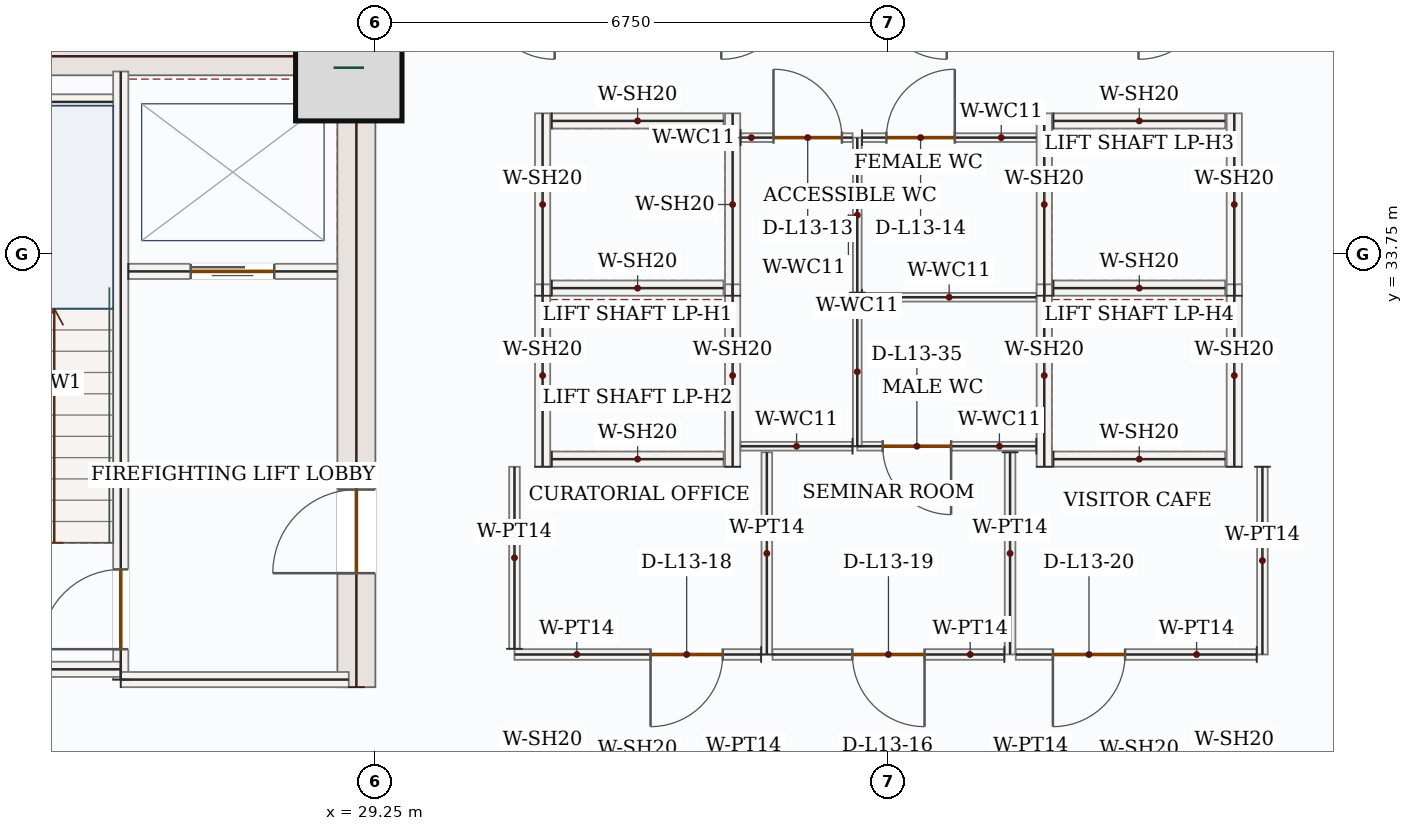
"""IFC4 building model, lengths in metres.
Left out: names, types, materials, properties, quantities, classifications, styles, units other than length and angle.
Written with IfcOpenShell. Run it as: python <this file> out.ifc"""

import sys

from ifc_helpers import new_model, si_unit, direction, frame, frame_2d, origin, origin_2d, place, context, subcontext, project, spatial, rectangle, extrude, source, transform, mapped, element, fill, save


model = new_model("IFC4")
c1 = context("Model", 3, precision=1e-05, world=origin(), true_north=direction((0.0, 1.0)))
c2 = subcontext(c1, "Body", "Model", "MODEL_VIEW")
j1 = project(units=[si_unit("LENGTHUNIT", "METRE"), si_unit("PLANEANGLEUNIT", "RADIAN")], contexts=[c1])
p1 = place(None, origin())
s1 = spatial("IfcSite", under=j1, at=p1, CompositionType="ELEMENT")
p2 = place(p1, origin())
s2 = spatial("IfcBuilding", under=s1, at=p2, CompositionType="ELEMENT")
p3 = place(p2, frame((0.0, 0.0, 62.7)))
s3 = spatial("IfcBuildingStorey", under=s2, at=p3, CompositionType="ELEMENT", Elevation=62.7)
p4 = place(p3, frame((29.0, 28.05, 0.0), z_axis=(0.0, 0.0, 1.0), x_axis=(0.0, 1.0, 0.0)))
e1 = element("IfcWall", 1, at=p4, inside=s3, PredefinedType="SHEAR", context=c2, shape_type="SweptSolid", body=[
    extrude(rectangle(XDim=8.55, YDim=0.5, at=frame_2d((4.275, 0.0))), origin(), (0.0, 0.0, 1.0), 3.95),
])
p5 = place(p4, frame((1.5, 0.0, 0.0)))
e2 = element("IfcOpeningElement", 2, at=p5, cuts=e1, PredefinedType="OPENING", context=c2, shape_type="SweptSolid", body=[
    extrude(rectangle(XDim=1.1, YDim=2.2, at=frame_2d((0.55, 1.1))), frame((0.0, 0.26, 0.0), z_axis=(0.0, -1.0, 0.0), x_axis=(1.0, 0.0, 0.0)), (0.0, 0.0, 1.0), 0.52),
])
m1 = source(origin(), c2, "Body", "SweptSolid", [
    extrude(rectangle(XDim=7.0, YDim=0.5, at=frame_2d((3.5, 0.0))), origin(), (0.0, 0.0, 1.0), 3.95),
])
p6 = place(p3, frame((21.75, 36.35, 0.0), z_axis=(0.0, 0.0, 1.0), x_axis=(1.0, 0.0, 0.0)))
e3 = element("IfcWall", 3, at=p6, inside=s3, PredefinedType="SHEAR", context=c2, shape_type="MappedRepresentation", body=[
    mapped(m1, transform((0.0, 0.0, 0.0), x_axis=(1.0, 0.0, 0.0), y_axis=(0.0, 1.0, 0.0), z_axis=(0.0, 0.0, 1.0), scale=1.0)),
])
m2 = source(origin(), c2, "Body", "SweptSolid", [
    extrude(rectangle(XDim=1.4, YDim=1.4, at=origin_2d()), origin(), (0.0, 0.0, 1.0), 4.2),
])
p7 = place(p3, frame((28.9, 36.2, 0.0), z_axis=(0.0, 0.0, 1.0), x_axis=(1.0, 0.0, 0.0)))
e4 = element("IfcColumn", 4, at=p7, inside=s3, PredefinedType="COLUMN", context=c2, shape_type="MappedRepresentation", body=[
    mapped(m2, transform((0.0, 0.0, 0.0), x_axis=(1.0, 0.0, 0.0), y_axis=(0.0, 1.0, 0.0), z_axis=(0.0, 0.0, 1.0), scale=1.0)),
])
p8 = place(p3, frame((25.9, 28.15, 0.0), z_axis=(0.0, 0.0, 1.0), x_axis=(0.0, 1.0, 0.0)))
e5 = element("IfcWall", 5, at=p8, inside=s3, PredefinedType="SOLIDWALL", context=c2, shape_type="SweptSolid", body=[
    extrude(rectangle(XDim=8.0, YDim=0.2, at=frame_2d((4.0, 0.0))), origin(), (0.0, 0.0, 1.0), 3.95),
])
p9 = place(p8, frame((0.4, 0.0, 0.0)))
e6 = element("IfcOpeningElement", 6, at=p9, cuts=e5, PredefinedType="OPENING", context=c2, shape_type="SweptSolid", body=[
    extrude(rectangle(XDim=1.05, YDim=2.15, at=frame_2d((0.525, 1.075))), frame((0.0, 0.11, 0.0), z_axis=(0.0, -1.0, 0.0), x_axis=(1.0, 0.0, 0.0)), (0.0, 0.0, 1.0), 0.22),
])
m3 = source(origin(), c2, "Body", "SweptSolid", [
    extrude(rectangle(XDim=4.25, YDim=0.2, at=frame_2d((2.125, 0.0))), origin(), (0.0, 0.0, 1.0), 3.95),
])
p10 = place(p3, frame((21.65, 28.285, 0.0), z_axis=(0.0, 0.0, 1.0), x_axis=(1.0, 0.0, 0.0)))
e7 = element("IfcWall", 7, at=p10, inside=s3, PredefinedType="SOLIDWALL", context=c2, shape_type="MappedRepresentation", body=[
    mapped(m3, transform((0.0, 0.0, 0.0), x_axis=(1.0, 0.0, 0.0), y_axis=(0.0, 1.0, 0.0), z_axis=(0.0, 0.0, 1.0), scale=1.0)),
])
m4 = source(origin(), c2, "Body", "SweptSolid", [
    extrude(rectangle(XDim=3.0, YDim=0.2, at=frame_2d((1.5, 0.0))), origin(), (0.0, 0.0, 1.0), 3.95),
])
p11 = place(p3, frame((25.9, 28.15, 0.0), z_axis=(0.0, 0.0, 1.0), x_axis=(1.0, 0.0, 0.0)))
e8 = element("IfcWall", 8, at=p11, inside=s3, PredefinedType="SOLIDWALL", context=c2, shape_type="MappedRepresentation", body=[
    mapped(m4, transform((0.0, 0.0, 0.0), x_axis=(1.0, 0.0, 0.0), y_axis=(0.0, 1.0, 0.0), z_axis=(0.0, 0.0, 1.0), scale=1.0)),
])
m5 = source(origin(), c2, "Body", "SweptSolid", [
    extrude(rectangle(XDim=3.25, YDim=0.2, at=frame_2d((1.625, 0.0))), origin(), (0.0, 0.0, 1.0), 3.95),
])
p12 = place(p3, frame((22.55, 35.75, 0.0), z_axis=(0.0, 0.0, 1.0), x_axis=(1.0, 0.0, 0.0)))
e9 = element("IfcWall", 9, at=p12, inside=s3, PredefinedType="SOLIDWALL", context=c2, shape_type="MappedRepresentation", body=[
    mapped(m5, transform((0.0, 0.0, 0.0), x_axis=(1.0, 0.0, 0.0), y_axis=(0.0, 1.0, 0.0), z_axis=(0.0, 0.0, 1.0), scale=1.0)),
])
p13 = place(p3, frame((26.0, 33.52, 0.0), z_axis=(0.0, 0.0, 1.0), x_axis=(1.0, 0.0, 0.0)))
e10 = element("IfcWall", 10, at=p13, inside=s3, PredefinedType="SOLIDWALL", context=c2, shape_type="SweptSolid", body=[
    extrude(rectangle(XDim=2.75, YDim=0.2, at=frame_2d((1.375, 0.0))), origin(), (0.0, 0.0, 1.0), 3.95),
])
p14 = place(p13, frame((0.82, 0.0, 0.0)))
e11 = element("IfcOpeningElement", 11, at=p14, cuts=e10, PredefinedType="OPENING", context=c2, shape_type="SweptSolid", body=[
    extrude(rectangle(XDim=1.1, YDim=2.15, at=frame_2d((0.55, 1.075))), frame((0.0, 0.11, 0.0), z_axis=(0.0, -1.0, 0.0), x_axis=(1.0, 0.0, 0.0)), (0.0, 0.0, 1.0), 0.22),
])
m6 = source(origin(), c2, "Body", "SweptSolid", [
    extrude(rectangle(XDim=2.4, YDim=0.2, at=frame_2d((1.2, 0.0))), origin(), (0.0, 0.0, 1.0), 3.95),
])
for number, where, z_axis, x_axis in (
    (12, (31.45, 33.2, 0.0), (0.0, 0.0, 1.0), (0.0, 1.0, 0.0)),
    (13, (33.95, 33.2, 0.0), (0.0, 0.0, 1.0), (0.0, 1.0, 0.0)),
):
    element("IfcWall", number, at=place(p3, frame(where, z_axis=z_axis, x_axis=x_axis)), inside=s3, PredefinedType="SOLIDWALL", context=c2, shape_type="MappedRepresentation", body=[
        mapped(m6, transform((0.0, 0.0, 0.0), x_axis=(1.0, 0.0, 0.0), y_axis=(0.0, 1.0, 0.0), z_axis=(0.0, 0.0, 1.0), scale=1.0)),
    ])
m7 = source(origin(), c2, "Body", "SweptSolid", [
    extrude(rectangle(XDim=2.26, YDim=0.2, at=frame_2d((1.13, 0.0))), origin(), (0.0, 0.0, 1.0), 3.95),
])
for number, where, z_axis, x_axis in (
    (14, (31.57, 33.3, 0.0), (0.0, 0.0, 1.0), (1.0, 0.0, 0.0)),
    (15, (31.57, 35.5, 0.0), (0.0, 0.0, 1.0), (1.0, 0.0, 0.0)),
):
    element("IfcWall", number, at=place(p3, frame(where, z_axis=z_axis, x_axis=x_axis)), inside=s3, PredefinedType="SOLIDWALL", context=c2, shape_type="MappedRepresentation", body=[
        mapped(m7, transform((0.0, 0.0, 0.0), x_axis=(1.0, 0.0, 0.0), y_axis=(0.0, 1.0, 0.0), z_axis=(0.0, 0.0, 1.0), scale=1.0)),
    ])
for number, where, z_axis, x_axis in (
    (16, (31.45, 30.95, 0.0), (0.0, 0.0, 1.0), (0.0, 1.0, 0.0)),
    (17, (33.95, 30.95, 0.0), (0.0, 0.0, 1.0), (0.0, 1.0, 0.0)),
):
    element("IfcWall", number, at=place(p3, frame(where, z_axis=z_axis, x_axis=x_axis)), inside=s3, PredefinedType="SOLIDWALL", context=c2, shape_type="MappedRepresentation", body=[
        mapped(m6, transform((0.0, 0.0, 0.0), x_axis=(1.0, 0.0, 0.0), y_axis=(0.0, 1.0, 0.0), z_axis=(0.0, 0.0, 1.0), scale=1.0)),
    ])
p15 = place(p3, frame((31.57, 31.05, 0.0), z_axis=(0.0, 0.0, 1.0), x_axis=(1.0, 0.0, 0.0)))
e18 = element("IfcWall", 18, at=p15, inside=s3, PredefinedType="SOLIDWALL", context=c2, shape_type="MappedRepresentation", body=[
    mapped(m7, transform((0.0, 0.0, 0.0), x_axis=(1.0, 0.0, 0.0), y_axis=(0.0, 1.0, 0.0), z_axis=(0.0, 0.0, 1.0), scale=1.0)),
])
for number, where, z_axis, x_axis in (
    (19, (38.05, 33.2, 0.0), (0.0, 0.0, 1.0), (0.0, 1.0, 0.0)),
    (20, (40.55, 33.2, 0.0), (0.0, 0.0, 1.0), (0.0, 1.0, 0.0)),
):
    element("IfcWall", number, at=place(p3, frame(where, z_axis=z_axis, x_axis=x_axis)), inside=s3, PredefinedType="SOLIDWALL", context=c2, shape_type="MappedRepresentation", body=[
        mapped(m6, transform((0.0, 0.0, 0.0), x_axis=(1.0, 0.0, 0.0), y_axis=(0.0, 1.0, 0.0), z_axis=(0.0, 0.0, 1.0), scale=1.0)),
    ])
for number, where, z_axis, x_axis in (
    (21, (38.17, 33.3, 0.0), (0.0, 0.0, 1.0), (1.0, 0.0, 0.0)),
    (22, (38.17, 35.5, 0.0), (0.0, 0.0, 1.0), (1.0, 0.0, 0.0)),
):
    element("IfcWall", number, at=place(p3, frame(where, z_axis=z_axis, x_axis=x_axis)), inside=s3, PredefinedType="SOLIDWALL", context=c2, shape_type="MappedRepresentation", body=[
        mapped(m7, transform((0.0, 0.0, 0.0), x_axis=(1.0, 0.0, 0.0), y_axis=(0.0, 1.0, 0.0), z_axis=(0.0, 0.0, 1.0), scale=1.0)),
    ])
for number, where, z_axis, x_axis in (
    (23, (38.05, 30.95, 0.0), (0.0, 0.0, 1.0), (0.0, 1.0, 0.0)),
    (24, (40.55, 30.95, 0.0), (0.0, 0.0, 1.0), (0.0, 1.0, 0.0)),
):
    element("IfcWall", number, at=place(p3, frame(where, z_axis=z_axis, x_axis=x_axis)), inside=s3, PredefinedType="SOLIDWALL", context=c2, shape_type="MappedRepresentation", body=[
        mapped(m6, transform((0.0, 0.0, 0.0), x_axis=(1.0, 0.0, 0.0), y_axis=(0.0, 1.0, 0.0), z_axis=(0.0, 0.0, 1.0), scale=1.0)),
    ])
p16 = place(p3, frame((38.17, 31.05, 0.0), z_axis=(0.0, 0.0, 1.0), x_axis=(1.0, 0.0, 0.0)))
e25 = element("IfcWall", 25, at=p16, inside=s3, PredefinedType="SOLIDWALL", context=c2, shape_type="MappedRepresentation", body=[
    mapped(m7, transform((0.0, 0.0, 0.0), x_axis=(1.0, 0.0, 0.0), y_axis=(0.0, 1.0, 0.0), z_axis=(0.0, 0.0, 1.0), scale=1.0)),
])
p17 = place(p3, frame((37.945, 31.22, 0.0), z_axis=(0.0, 0.0, 1.0), x_axis=(-1.0, 0.0, 0.0)))
e26 = element("IfcWall", 26, at=p17, inside=s3, PredefinedType="PARTITIONING", context=c2, shape_type="SweptSolid", body=[
    extrude(rectangle(XDim=2.355, YDim=0.115, at=frame_2d((1.177, 0.0))), origin(), (0.0, 0.0, 1.0), 3.95),
])
p18 = place(p17, frame((1.121, 0.0, 0.0)))
e27 = element("IfcOpeningElement", 27, at=p18, cuts=e26, PredefinedType="OPENING", context=c2, shape_type="SweptSolid", body=[
    extrude(rectangle(XDim=0.9, YDim=2.1, at=frame_2d((0.45, 1.05))), frame((0.0, 0.067, 0.0), z_axis=(0.0, -1.0, 0.0), x_axis=(1.0, 0.0, 0.0)), (0.0, 0.0, 1.0), 0.135),
])
m8 = source(origin(), c2, "Body", "SweptSolid", [
    extrude(rectangle(XDim=1.96, YDim=0.115, at=frame_2d((0.98, 0.0))), origin(), (0.0, 0.0, 1.0), 3.95),
])
p19 = place(p3, frame((35.59, 31.22, 0.0), z_axis=(0.0, 0.0, 1.0), x_axis=(0.0, 1.0, 0.0)))
e28 = element("IfcWall", 28, at=p19, inside=s3, PredefinedType="PARTITIONING", context=c2, shape_type="MappedRepresentation", body=[
    mapped(m8, transform((0.0, 0.0, 0.0), x_axis=(1.0, 0.0, 0.0), y_axis=(0.0, 1.0, 0.0), z_axis=(0.0, 0.0, 1.0), scale=1.0)),
])
m9 = source(origin(), c2, "Body", "SweptSolid", [
    extrude(rectangle(XDim=2.292, YDim=0.115, at=frame_2d((1.146, 0.0))), origin(), (0.0, 0.0, 1.0), 3.95),
])
p20 = place(p3, frame((35.653, 33.18, 0.0), z_axis=(0.0, 0.0, 1.0), x_axis=(1.0, 0.0, 0.0)))
e29 = element("IfcWall", 29, at=p20, inside=s3, PredefinedType="PARTITIONING", context=c2, shape_type="MappedRepresentation", body=[
    mapped(m9, transform((0.0, 0.0, 0.0), x_axis=(1.0, 0.0, 0.0), y_axis=(0.0, 1.0, 0.0), z_axis=(0.0, 0.0, 1.0), scale=1.0)),
])
m10 = source(origin(), c2, "Body", "SweptSolid", [
    extrude(rectangle(XDim=2.04, YDim=0.115, at=frame_2d((1.02, 0.0))), origin(), (0.0, 0.0, 1.0), 3.95),
])
p21 = place(p3, frame((35.59, 33.24, 0.0), z_axis=(0.0, 0.0, 1.0), x_axis=(0.0, 1.0, 0.0)))
e30 = element("IfcWall", 30, at=p21, inside=s3, PredefinedType="PARTITIONING", context=c2, shape_type="MappedRepresentation", body=[
    mapped(m10, transform((0.0, 0.0, 0.0), x_axis=(1.0, 0.0, 0.0), y_axis=(0.0, 1.0, 0.0), z_axis=(0.0, 0.0, 1.0), scale=1.0)),
])
p22 = place(p3, frame((35.653, 35.28, 0.0), z_axis=(0.0, 0.0, 1.0), x_axis=(1.0, 0.0, 0.0)))
e31 = element("IfcWall", 31, at=p22, inside=s3, PredefinedType="PARTITIONING", context=c2, shape_type="SweptSolid", body=[
    extrude(rectangle(XDim=2.292, YDim=0.115, at=frame_2d((1.146, 0.0))), origin(), (0.0, 0.0, 1.0), 3.95),
])
p23 = place(p22, frame((0.32, 0.0, 0.0)))
e32 = element("IfcOpeningElement", 32, at=p23, cuts=e31, PredefinedType="OPENING", context=c2, shape_type="SweptSolid", body=[
    extrude(rectangle(XDim=0.9, YDim=2.1, at=frame_2d((0.45, 1.05))), frame((0.0, 0.067, 0.0), z_axis=(0.0, -1.0, 0.0), x_axis=(1.0, 0.0, 0.0)), (0.0, 0.0, 1.0), 0.135),
])
m11 = source(origin(), c2, "Body", "SweptSolid", [
    extrude(rectangle(XDim=1.473, YDim=0.115, at=frame_2d((0.736, 0.0))), origin(), (0.0, 0.0, 1.0), 3.95),
])
p24 = place(p3, frame((35.528, 31.22, 0.0), z_axis=(0.0, 0.0, 1.0), x_axis=(-1.0, 0.0, 0.0)))
e33 = element("IfcWall", 33, at=p24, inside=s3, PredefinedType="PARTITIONING", context=c2, shape_type="MappedRepresentation", body=[
    mapped(m11, transform((0.0, 0.0, 0.0), x_axis=(1.0, 0.0, 0.0), y_axis=(0.0, 1.0, 0.0), z_axis=(0.0, 0.0, 1.0), scale=1.0)),
])
p25 = place(p3, frame((34.055, 35.28, 0.0), z_axis=(0.0, 0.0, 1.0), x_axis=(1.0, 0.0, 0.0)))
e34 = element("IfcWall", 34, at=p25, inside=s3, PredefinedType="PARTITIONING", context=c2, shape_type="SweptSolid", body=[
    extrude(rectangle(XDim=1.473, YDim=0.115, at=frame_2d((0.736, 0.0))), origin(), (0.0, 0.0, 1.0), 3.95),
])
p26 = place(p25, frame((0.433, 0.0, 0.0)))
e35 = element("IfcOpeningElement", 35, at=p26, cuts=e34, PredefinedType="OPENING", context=c2, shape_type="SweptSolid", body=[
    extrude(rectangle(XDim=0.9, YDim=2.1, at=frame_2d((0.45, 1.05))), frame((0.0, 0.067, 0.0), z_axis=(0.0, -1.0, 0.0), x_axis=(1.0, 0.0, 0.0)), (0.0, 0.0, 1.0), 0.135),
])
m12 = source(origin(), c2, "Body", "SweptSolid", [
    extrude(rectangle(XDim=2.66, YDim=0.14, at=frame_2d((1.33, 0.0))), origin(), (0.0, 0.0, 1.0), 3.95),
])
for number, where, z_axis, x_axis in (
    (36, (34.4, 28.48, 0.0), (0.0, 0.0, 1.0), (0.0, 1.0, 0.0)),
    (37, (37.6, 31.14, 0.0), (0.0, 0.0, 1.0), (0.0, -1.0, 0.0)),
):
    element("IfcWall", number, at=place(p3, frame(where, z_axis=z_axis, x_axis=x_axis)), inside=s3, PredefinedType="PARTITIONING", context=c2, shape_type="MappedRepresentation", body=[
        mapped(m12, transform((0.0, 0.0, 0.0), x_axis=(1.0, 0.0, 0.0), y_axis=(0.0, 1.0, 0.0), z_axis=(0.0, 0.0, 1.0), scale=1.0)),
    ])
p27 = place(p3, frame((37.525, 28.48, 0.0), z_axis=(0.0, 0.0, 1.0), x_axis=(-1.0, 0.0, 0.0)))
e38 = element("IfcWall", 38, at=p27, inside=s3, PredefinedType="PARTITIONING", context=c2, shape_type="SweptSolid", body=[
    extrude(rectangle(XDim=3.05, YDim=0.14, at=frame_2d((1.525, 0.0))), origin(), (0.0, 0.0, 1.0), 3.95),
])
p28 = place(p27, frame((1.05, 0.0, 0.0)))
e39 = element("IfcOpeningElement", 39, at=p28, cuts=e38, PredefinedType="OPENING", context=c2, shape_type="SweptSolid", body=[
    extrude(rectangle(XDim=0.95, YDim=2.15, at=frame_2d((0.475, 1.075))), frame((0.0, 0.08, 0.0), z_axis=(0.0, -1.0, 0.0), x_axis=(1.0, 0.0, 0.0)), (0.0, 0.0, 1.0), 0.16),
])
p29 = place(p3, frame((34.325, 28.48, 0.0), z_axis=(0.0, 0.0, 1.0), x_axis=(-1.0, 0.0, 0.0)))
e40 = element("IfcWall", 40, at=p29, inside=s3, PredefinedType="PARTITIONING", context=c2, shape_type="SweptSolid", body=[
    extrude(rectangle(XDim=3.245, YDim=0.14, at=frame_2d((1.623, 0.0))), origin(), (0.0, 0.0, 1.0), 3.95),
])
p30 = place(p29, frame((0.505, 0.0, 0.0)))
e41 = element("IfcOpeningElement", 41, at=p30, cuts=e40, PredefinedType="OPENING", context=c2, shape_type="SweptSolid", body=[
    extrude(rectangle(XDim=0.95, YDim=2.15, at=frame_2d((0.475, 1.075))), frame((0.0, 0.08, 0.0), z_axis=(0.0, -1.0, 0.0), x_axis=(1.0, 0.0, 0.0)), (0.0, 0.0, 1.0), 0.16),
])
m13 = source(origin(), c2, "Body", "SweptSolid", [
    extrude(rectangle(XDim=2.395, YDim=0.14, at=frame_2d((1.198, 0.0))), origin(), (0.0, 0.0, 1.0), 3.95),
])
p31 = place(p3, frame((31.08, 28.555, 0.0), z_axis=(0.0, 0.0, 1.0), x_axis=(0.0, 1.0, 0.0)))
e42 = element("IfcWall", 42, at=p31, inside=s3, PredefinedType="PARTITIONING", context=c2, shape_type="MappedRepresentation", body=[
    mapped(m13, transform((0.0, 0.0, 0.0), x_axis=(1.0, 0.0, 0.0), y_axis=(0.0, 1.0, 0.0), z_axis=(0.0, 0.0, 1.0), scale=1.0)),
])
m14 = source(origin(), c2, "Body", "SweptSolid", [
    extrude(rectangle(XDim=2.47, YDim=0.14, at=frame_2d((1.235, 0.0))), origin(), (0.0, 0.0, 1.0), 3.95),
])
p32 = place(p3, frame((40.92, 30.95, 0.0), z_axis=(0.0, 0.0, 1.0), x_axis=(0.0, -1.0, 0.0)))
e43 = element("IfcWall", 43, at=p32, inside=s3, PredefinedType="PARTITIONING", context=c2, shape_type="MappedRepresentation", body=[
    mapped(m14, transform((0.0, 0.0, 0.0), x_axis=(1.0, 0.0, 0.0), y_axis=(0.0, 1.0, 0.0), z_axis=(0.0, 0.0, 1.0), scale=1.0)),
])
p33 = place(p3, frame((40.845, 28.48, 0.0), z_axis=(0.0, 0.0, 1.0), x_axis=(-1.0, 0.0, 0.0)))
e44 = element("IfcWall", 44, at=p33, inside=s3, PredefinedType="PARTITIONING", context=c2, shape_type="SweptSolid", body=[
    extrude(rectangle(XDim=3.17, YDim=0.14, at=frame_2d((1.585, 0.0))), origin(), (0.0, 0.0, 1.0), 3.95),
])
p34 = place(p33, frame((1.732, 0.0, 0.0)))
e45 = element("IfcOpeningElement", 45, at=p34, cuts=e44, PredefinedType="OPENING", context=c2, shape_type="SweptSolid", body=[
    extrude(rectangle(XDim=0.95, YDim=2.15, at=frame_2d((0.475, 1.075))), frame((0.0, 0.08, 0.0), z_axis=(0.0, -1.0, 0.0), x_axis=(1.0, 0.0, 0.0)), (0.0, 0.0, 1.0), 0.16),
])
m15 = source(origin(), c2, "Body", "SweptSolid", [
    extrude(rectangle(XDim=1.05, YDim=2.15, at=frame_2d((0.525, 1.075))), frame((0.0, 0.025, 0.0), z_axis=(0.0, -1.0, 0.0), x_axis=(1.0, 0.0, 0.0)), (0.0, 0.0, 1.0), 0.05),
])
p35 = place(p9, origin())
e46 = element("IfcDoor", 46, at=p35, inside=s3, OperationType="SINGLE_SWING_LEFT", PredefinedType="DOOR", context=c2, shape_type="MappedRepresentation", body=[
    mapped(m15, transform((0.0, 0.0, 0.0), x_axis=(1.0, 0.0, 0.0), y_axis=(0.0, 1.0, 0.0), z_axis=(0.0, 0.0, 1.0), scale=1.0)),
])
fill(e6, e46)
m16 = source(origin(), c2, "Body", "SweptSolid", [
    extrude(rectangle(XDim=1.1, YDim=2.15, at=frame_2d((0.55, 1.075))), frame((0.0, 0.025, 0.0), z_axis=(0.0, -1.0, 0.0), x_axis=(1.0, 0.0, 0.0)), (0.0, 0.0, 1.0), 0.05),
])
p36 = place(p14, origin())
e47 = element("IfcDoor", 47, at=p36, inside=s3, OperationType="DOUBLE_DOOR_SLIDING", PredefinedType="DOOR", context=c2, shape_type="MappedRepresentation", body=[
    mapped(m16, transform((0.0, 0.0, 0.0), x_axis=(1.0, 0.0, 0.0), y_axis=(0.0, 1.0, 0.0), z_axis=(0.0, 0.0, 1.0), scale=1.0)),
])
fill(e11, e47)
m17 = source(origin(), c2, "Body", "SweptSolid", [
    extrude(rectangle(XDim=1.1, YDim=2.2, at=frame_2d((0.55, 1.1))), frame((0.0, 0.025, 0.0), z_axis=(0.0, -1.0, 0.0), x_axis=(1.0, 0.0, 0.0)), (0.0, 0.0, 1.0), 0.05),
])
p37 = place(p5, origin())
e48 = element("IfcDoor", 48, at=p37, inside=s3, OperationType="SINGLE_SWING_LEFT", PredefinedType="DOOR", context=c2, shape_type="MappedRepresentation", body=[
    mapped(m17, transform((0.0, 0.0, 0.0), x_axis=(1.0, 0.0, 0.0), y_axis=(0.0, 1.0, 0.0), z_axis=(0.0, 0.0, 1.0), scale=1.0)),
])
fill(e2, e48)
m18 = source(origin(), c2, "Body", "SweptSolid", [
    extrude(rectangle(XDim=0.9, YDim=2.1, at=frame_2d((0.45, 1.05))), frame((0.0, 0.025, 0.0), z_axis=(0.0, -1.0, 0.0), x_axis=(1.0, 0.0, 0.0)), (0.0, 0.0, 1.0), 0.05),
])
p38 = place(p26, origin())
e49 = element("IfcDoor", 49, at=p38, inside=s3, OperationType="SINGLE_SWING_LEFT", PredefinedType="DOOR", context=c2, shape_type="MappedRepresentation", body=[
    mapped(m18, transform((0.0, 0.0, 0.0), x_axis=(1.0, 0.0, 0.0), y_axis=(0.0, 1.0, 0.0), z_axis=(0.0, 0.0, 1.0), scale=1.0)),
])
fill(e35, e49)
p39 = place(p23, origin())
e50 = element("IfcDoor", 50, at=p39, inside=s3, OperationType="SINGLE_SWING_RIGHT", PredefinedType="DOOR", context=c2, shape_type="MappedRepresentation", body=[
    mapped(m18, transform((0.0, 0.0, 0.0), x_axis=(1.0, 0.0, 0.0), y_axis=(0.0, 1.0, 0.0), z_axis=(0.0, 0.0, 1.0), scale=1.0)),
])
fill(e32, e50)
m19 = source(origin(), c2, "Body", "SweptSolid", [
    extrude(rectangle(XDim=0.95, YDim=2.15, at=frame_2d((0.475, 1.075))), frame((0.0, 0.025, 0.0), z_axis=(0.0, -1.0, 0.0), x_axis=(1.0, 0.0, 0.0)), (0.0, 0.0, 1.0), 0.05),
])
p40 = place(p30, origin())
e51 = element("IfcDoor", 51, at=p40, inside=s3, OperationType="SINGLE_SWING_RIGHT", PredefinedType="DOOR", context=c2, shape_type="MappedRepresentation", body=[
    mapped(m19, transform((0.0, 0.0, 0.0), x_axis=(1.0, 0.0, 0.0), y_axis=(0.0, 1.0, 0.0), z_axis=(0.0, 0.0, 1.0), scale=1.0)),
])
fill(e41, e51)
p41 = place(p28, origin())
e52 = element("IfcDoor", 52, at=p41, inside=s3, OperationType="SINGLE_SWING_LEFT", PredefinedType="DOOR", context=c2, shape_type="MappedRepresentation", body=[
    mapped(m19, transform((0.0, 0.0, 0.0), x_axis=(1.0, 0.0, 0.0), y_axis=(0.0, 1.0, 0.0), z_axis=(0.0, 0.0, 1.0), scale=1.0)),
])
fill(e39, e52)
p42 = place(p34, origin())
e53 = element("IfcDoor", 53, at=p42, inside=s3, OperationType="SINGLE_SWING_RIGHT", PredefinedType="DOOR", context=c2, shape_type="MappedRepresentation", body=[
    mapped(m19, transform((0.0, 0.0, 0.0), x_axis=(1.0, 0.0, 0.0), y_axis=(0.0, 1.0, 0.0), z_axis=(0.0, 0.0, 1.0), scale=1.0)),
])
fill(e45, e53)
p43 = place(p18, origin())
e54 = element("IfcDoor", 54, at=p43, inside=s3, OperationType="SINGLE_SWING_LEFT", PredefinedType="DOOR", context=c2, shape_type="MappedRepresentation", body=[
    mapped(m18, transform((0.0, 0.0, 0.0), x_axis=(1.0, 0.0, 0.0), y_axis=(0.0, 1.0, 0.0), z_axis=(0.0, 0.0, 1.0), scale=1.0)),
])
fill(e27, e54)
save(model, sys.argv[1])
